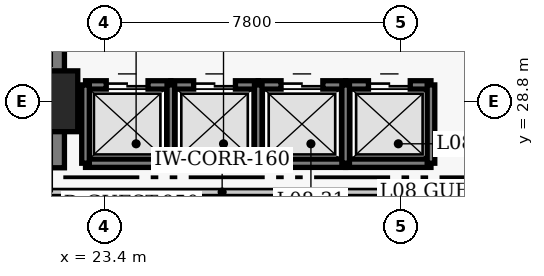
"""IFC4 building model, lengths in metres.
Left out: names, types, materials, properties, quantities, classifications, styles, units other than length and angle.
Written with IfcOpenShell. Run it as: python <this file> out.ifc"""

import sys

from ifc_helpers import new_model, si_unit, direction, frame, frame_2d, origin, origin_2d, place, context, subcontext, project, spatial, rectangle, extrude, element, fill, save


model = new_model("IFC4")
c1 = context("Model", 3, precision=1e-05, world=origin(), true_north=direction((0.0, 1.0)))
c2 = subcontext(c1, "Body", "Model", "MODEL_VIEW")
j1 = project(units=[si_unit("LENGTHUNIT", "METRE"), si_unit("PLANEANGLEUNIT", "RADIAN")], contexts=[c1])
p1 = place(None, origin())
s1 = spatial("IfcSite", under=j1, at=p1, CompositionType="ELEMENT")
p2 = place(p1, origin())
s2 = spatial("IfcBuilding", under=s1, at=p2, CompositionType="ELEMENT")
p3 = place(p2, frame((0.0, 0.0, 37.4)))
s3 = spatial("IfcBuildingStorey", under=s2, at=p3, CompositionType="ELEMENT", Elevation=37.4)
p4 = place(p3, frame((21.9, 27.05, 0.0), z_axis=(0.0, 0.0, 1.0), x_axis=(0.0, 1.0, 0.0)))
e1 = element("IfcWall", 1, at=p4, inside=s3, PredefinedType="SHEAR", context=c2, shape_type="SweptSolid", body=[
    extrude(rectangle(XDim=13.72, YDim=0.9, at=frame_2d((6.86, 0.0))), origin(), (0.0, 0.0, 1.0), 3.8),
])
p5 = place(p3, frame((21.9, 28.8, 0.0), z_axis=(0.0, 0.0, 1.0), x_axis=(1.0, 0.0, 0.0)))
e2 = element("IfcColumn", 2, at=p5, inside=s3, PredefinedType="COLUMN", context=c2, shape_type="SweptSolid", body=[
    extrude(rectangle(XDim=1.6, YDim=1.6, at=origin_2d()), origin(), (0.0, 0.0, 1.0), 3.8),
])
p6 = place(p3, frame((22.905, 29.23, 0.0), z_axis=(0.0, 0.0, 1.0), x_axis=(1.0, 0.0, 0.0)))
e3 = element("IfcWall", 3, at=p6, inside=s3, PredefinedType="SHEAR", context=c2, shape_type="SweptSolid", body=[
    extrude(rectangle(XDim=2.245, YDim=0.22, at=frame_2d((1.123, 0.0))), origin(), (0.0, 0.0, 1.0), 3.8),
])
p7 = place(p6, frame((0.545, 0.0, 0.0)))
e4 = element("IfcOpeningElement", 4, at=p7, cuts=e3, PredefinedType="OPENING", context=c2, shape_type="SweptSolid", body=[
    extrude(rectangle(XDim=1.1, YDim=2.15, at=frame_2d((0.55, 1.075))), frame((0.0, 0.12, 0.0), z_axis=(0.0, -1.0, 0.0), x_axis=(1.0, 0.0, 0.0)), (0.0, 0.0, 1.0), 0.24),
])
p8 = place(p3, frame((22.905, 27.17, 0.0), z_axis=(0.0, 0.0, 1.0), x_axis=(1.0, 0.0, 0.0)))
e5 = element("IfcWall", 5, at=p8, inside=s3, PredefinedType="SHEAR", context=c2, shape_type="SweptSolid", body=[
    extrude(rectangle(XDim=2.245, YDim=0.22, at=frame_2d((1.123, 0.0))), origin(), (0.0, 0.0, 1.0), 3.8),
])
p9 = place(p3, frame((22.905, 27.17, 0.0), z_axis=(0.0, 0.0, 1.0), x_axis=(0.0, 1.0, 0.0)))
e6 = element("IfcWall", 6, at=p9, inside=s3, PredefinedType="SHEAR", context=c2, shape_type="SweptSolid", body=[
    extrude(rectangle(XDim=2.06, YDim=0.2, at=frame_2d((1.03, 0.0))), origin(), (0.0, 0.0, 1.0), 3.8),
])
p10 = place(p3, frame((25.15, 29.23, 0.0), z_axis=(0.0, 0.0, 1.0), x_axis=(1.0, 0.0, 0.0)))
e7 = element("IfcWall", 7, at=p10, inside=s3, PredefinedType="SHEAR", context=c2, shape_type="SweptSolid", body=[
    extrude(rectangle(XDim=2.3, YDim=0.22, at=frame_2d((1.15, 0.0))), origin(), (0.0, 0.0, 1.0), 3.8),
])
p11 = place(p10, frame((0.6, 0.0, 0.0)))
e8 = element("IfcOpeningElement", 8, at=p11, cuts=e7, PredefinedType="OPENING", context=c2, shape_type="SweptSolid", body=[
    extrude(rectangle(XDim=1.1, YDim=2.15, at=frame_2d((0.55, 1.075))), frame((0.0, 0.12, 0.0), z_axis=(0.0, -1.0, 0.0), x_axis=(1.0, 0.0, 0.0)), (0.0, 0.0, 1.0), 0.24),
])
p12 = place(p3, frame((25.15, 27.17, 0.0), z_axis=(0.0, 0.0, 1.0), x_axis=(1.0, 0.0, 0.0)))
e9 = element("IfcWall", 9, at=p12, inside=s3, PredefinedType="SHEAR", context=c2, shape_type="SweptSolid", body=[
    extrude(rectangle(XDim=2.3, YDim=0.22, at=frame_2d((1.15, 0.0))), origin(), (0.0, 0.0, 1.0), 3.8),
])
p13 = place(p3, frame((25.15, 27.17, 0.0), z_axis=(0.0, 0.0, 1.0), x_axis=(0.0, 1.0, 0.0)))
e10 = element("IfcWall", 10, at=p13, inside=s3, PredefinedType="SHEAR", context=c2, shape_type="SweptSolid", body=[
    extrude(rectangle(XDim=2.06, YDim=0.2, at=frame_2d((1.03, 0.0))), origin(), (0.0, 0.0, 1.0), 3.8),
])
p14 = place(p3, frame((27.45, 29.23, 0.0), z_axis=(0.0, 0.0, 1.0), x_axis=(1.0, 0.0, 0.0)))
e11 = element("IfcWall", 11, at=p14, inside=s3, PredefinedType="SHEAR", context=c2, shape_type="SweptSolid", body=[
    extrude(rectangle(XDim=2.3, YDim=0.22, at=frame_2d((1.15, 0.0))), origin(), (0.0, 0.0, 1.0), 3.8),
])
p15 = place(p14, frame((0.6, 0.0, 0.0)))
e12 = element("IfcOpeningElement", 12, at=p15, cuts=e11, PredefinedType="OPENING", context=c2, shape_type="SweptSolid", body=[
    extrude(rectangle(XDim=1.1, YDim=2.15, at=frame_2d((0.55, 1.075))), frame((0.0, 0.12, 0.0), z_axis=(0.0, -1.0, 0.0), x_axis=(1.0, 0.0, 0.0)), (0.0, 0.0, 1.0), 0.24),
])
p16 = place(p3, frame((27.45, 27.17, 0.0), z_axis=(0.0, 0.0, 1.0), x_axis=(1.0, 0.0, 0.0)))
e13 = element("IfcWall", 13, at=p16, inside=s3, PredefinedType="SHEAR", context=c2, shape_type="SweptSolid", body=[
    extrude(rectangle(XDim=2.3, YDim=0.22, at=frame_2d((1.15, 0.0))), origin(), (0.0, 0.0, 1.0), 3.8),
])
p17 = place(p3, frame((27.45, 27.17, 0.0), z_axis=(0.0, 0.0, 1.0), x_axis=(0.0, 1.0, 0.0)))
e14 = element("IfcWall", 14, at=p17, inside=s3, PredefinedType="SHEAR", context=c2, shape_type="SweptSolid", body=[
    extrude(rectangle(XDim=2.06, YDim=0.2, at=frame_2d((1.03, 0.0))), origin(), (0.0, 0.0, 1.0), 3.8),
])
p18 = place(p3, frame((29.75, 29.23, 0.0), z_axis=(0.0, 0.0, 1.0), x_axis=(1.0, 0.0, 0.0)))
e15 = element("IfcWall", 15, at=p18, inside=s3, PredefinedType="SHEAR", context=c2, shape_type="SweptSolid", body=[
    extrude(rectangle(XDim=2.245, YDim=0.22, at=frame_2d((1.123, 0.0))), origin(), (0.0, 0.0, 1.0), 3.8),
])
p19 = place(p18, frame((0.6, 0.0, 0.0)))
e16 = element("IfcOpeningElement", 16, at=p19, cuts=e15, PredefinedType="OPENING", context=c2, shape_type="SweptSolid", body=[
    extrude(rectangle(XDim=1.1, YDim=2.15, at=frame_2d((0.55, 1.075))), frame((0.0, 0.12, 0.0), z_axis=(0.0, -1.0, 0.0), x_axis=(1.0, 0.0, 0.0)), (0.0, 0.0, 1.0), 0.24),
])
p20 = place(p3, frame((29.75, 27.17, 0.0), z_axis=(0.0, 0.0, 1.0), x_axis=(1.0, 0.0, 0.0)))
e17 = element("IfcWall", 17, at=p20, inside=s3, PredefinedType="SHEAR", context=c2, shape_type="SweptSolid", body=[
    extrude(rectangle(XDim=2.245, YDim=0.22, at=frame_2d((1.123, 0.0))), origin(), (0.0, 0.0, 1.0), 3.8),
])
for number, where, z_axis, x_axis in (
    (18, (29.75, 27.17, 0.0), (0.0, 0.0, 1.0), (0.0, 1.0, 0.0)),
    (19, (31.995, 27.17, 0.0), (0.0, 0.0, 1.0), (0.0, 1.0, 0.0)),
):
    element("IfcWall", number, at=place(p3, frame(where, z_axis=z_axis, x_axis=x_axis)), inside=s3, PredefinedType="SHEAR", context=c2, shape_type="SweptSolid", body=[
        extrude(rectangle(XDim=2.06, YDim=0.2, at=frame_2d((1.03, 0.0))), origin(), (0.0, 0.0, 1.0), 3.8),
    ])
p21 = place(p3, frame((19.35, 26.41, 0.0), z_axis=(0.0, 0.0, 1.0), x_axis=(1.0, 0.0, 0.0)))
e20 = element("IfcWall", 20, at=p21, inside=s3, PredefinedType="PARTITIONING", context=c2, shape_type="SweptSolid", body=[
    extrude(rectangle(XDim=14.3, YDim=0.16, at=frame_2d((7.15, 0.0))), origin(), (0.0, 0.0, 1.0), 3.54),
])
p22 = place(p7, origin())
e21 = element("IfcDoor", 21, at=p22, inside=s3, OperationType="DOUBLE_DOOR_SLIDING", PredefinedType="DOOR", context=c2, shape_type="SweptSolid", body=[
    extrude(rectangle(XDim=1.1, YDim=2.15, at=frame_2d((0.55, 1.075))), frame((0.0, 0.025, 0.0), z_axis=(0.0, -1.0, 0.0), x_axis=(1.0, 0.0, 0.0)), (0.0, 0.0, 1.0), 0.05),
])
fill(e4, e21)
p23 = place(p11, origin())
e22 = element("IfcDoor", 22, at=p23, inside=s3, OperationType="DOUBLE_DOOR_SLIDING", PredefinedType="DOOR", context=c2, shape_type="SweptSolid", body=[
    extrude(rectangle(XDim=1.1, YDim=2.15, at=frame_2d((0.55, 1.075))), frame((0.0, 0.025, 0.0), z_axis=(0.0, -1.0, 0.0), x_axis=(1.0, 0.0, 0.0)), (0.0, 0.0, 1.0), 0.05),
])
fill(e8, e22)
p24 = place(p15, origin())
e23 = element("IfcDoor", 23, at=p24, inside=s3, OperationType="DOUBLE_DOOR_SLIDING", PredefinedType="DOOR", context=c2, shape_type="SweptSolid", body=[
    extrude(rectangle(XDim=1.1, YDim=2.15, at=frame_2d((0.55, 1.075))), frame((0.0, 0.025, 0.0), z_axis=(0.0, -1.0, 0.0), x_axis=(1.0, 0.0, 0.0)), (0.0, 0.0, 1.0), 0.05),
])
fill(e12, e23)
p25 = place(p19, origin())
e24 = element("IfcDoor", 24, at=p25, inside=s3, OperationType="DOUBLE_DOOR_SLIDING", PredefinedType="DOOR", context=c2, shape_type="SweptSolid", body=[
    extrude(rectangle(XDim=1.1, YDim=2.15, at=frame_2d((0.55, 1.075))), frame((0.0, 0.025, 0.0), z_axis=(0.0, -1.0, 0.0), x_axis=(1.0, 0.0, 0.0)), (0.0, 0.0, 1.0), 0.05),
])
fill(e16, e24)
save(model, sys.argv[1])
